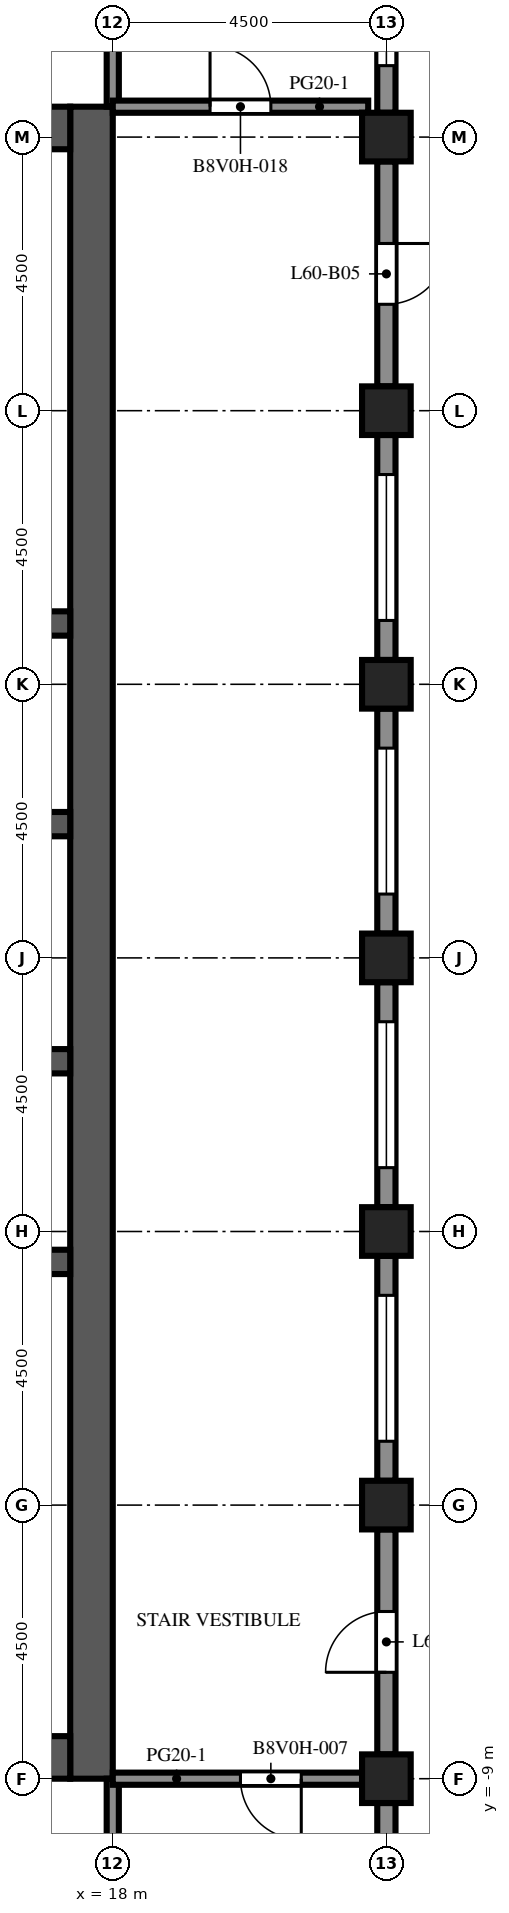
"""IFC4 building model, lengths in metres.
Left out: names, types, materials, properties, quantities, classifications, styles, units other than length and angle.
Written with IfcOpenShell. Run it as: python <this file> out.ifc"""

import sys

from ifc_helpers import new_model, si_unit, direction, frame, frame_2d, origin, origin_2d, place, context, subcontext, project, spatial, rectangle, extrude, element, fill, save


model = new_model("IFC4")
c1 = context("Model", 3, precision=1e-05, world=origin(), true_north=direction((0.0, 1.0)))
c2 = subcontext(c1, "Body", "Model", "MODEL_VIEW")
j1 = project(units=[si_unit("LENGTHUNIT", "METRE"), si_unit("PLANEANGLEUNIT", "RADIAN")], contexts=[c1])
p1 = place(None, origin())
s1 = spatial("IfcSite", under=j1, at=p1, CompositionType="ELEMENT")
p2 = place(p1, origin())
s2 = spatial("IfcBuilding", under=s1, at=p2, CompositionType="ELEMENT")
p3 = place(p2, frame((0.0, 0.0, 266.3)))
s3 = spatial("IfcBuildingStorey", under=s2, at=p3, CompositionType="ELEMENT", Elevation=266.3)
for number, where, z_axis, x_axis in (
    (1, (22.5, -9.0, -0.45), (0.0, 0.0, 1.0), (1.0, 0.0, 0.0)),
    (2, (22.5, -4.5, -0.45), (0.0, 0.0, 1.0), (1.0, 0.0, 0.0)),
    (3, (22.5, 0.0, -0.45), (0.0, 0.0, 1.0), (1.0, 0.0, 0.0)),
    (4, (22.5, 4.5, -0.45), (0.0, 0.0, 1.0), (1.0, 0.0, 0.0)),
    (5, (22.5, 9.0, -0.45), (0.0, 0.0, 1.0), (1.0, 0.0, 0.0)),
    (6, (22.5, 13.5, -0.45), (0.0, 0.0, 1.0), (1.0, 0.0, 0.0)),
    (7, (22.5, 18.0, -0.45), (0.0, 0.0, 1.0), (1.0, 0.0, 0.0)),
):
    element("IfcColumn", number, at=place(p3, frame(where, z_axis=z_axis, x_axis=x_axis)), inside=s3, PredefinedType="COLUMN", context=c2, shape_type="SweptSolid", body=[
        extrude(rectangle(XDim=0.8, YDim=0.8, at=origin_2d()), origin(), (0.0, 0.0, 1.0), 4.55),
    ])
p4 = place(p3, frame((17.65, -9.0, 0.0), z_axis=(0.0, 0.0, 1.0), x_axis=(0.0, 1.0, 0.0)))
e8 = element("IfcWall", 8, at=p4, inside=s3, PredefinedType="SHEAR", context=c2, shape_type="SweptSolid", body=[
    extrude(rectangle(XDim=27.5, YDim=0.7, at=frame_2d((13.75, 0.0))), origin(), (0.0, 0.0, 1.0), 4.1),
])
p5 = place(p4, frame((12.55, 0.0, 0.0)))
e9 = element("IfcOpeningElement", 9, at=p5, cuts=e8, PredefinedType="OPENING", context=c2, shape_type="SweptSolid", body=[
    extrude(rectangle(XDim=2.4, YDim=2.4, at=frame_2d((1.2, 1.2))), frame((0.0, 0.36, 0.0), z_axis=(0.0, -1.0, 0.0), x_axis=(1.0, 0.0, 0.0)), (0.0, 0.0, 1.0), 0.72),
])
p6 = place(p4, frame((6.825, 0.0, 0.0)))
e10 = element("IfcOpeningElement", 10, at=p6, cuts=e8, PredefinedType="OPENING", context=c2, shape_type="SweptSolid", body=[
    extrude(rectangle(XDim=1.2, YDim=2.1, at=frame_2d((0.6, 1.05))), frame((0.0, 0.36, 0.0), z_axis=(0.0, -1.0, 0.0), x_axis=(1.0, 0.0, 0.0)), (0.0, 0.0, 1.0), 0.72),
])
p7 = place(p4, frame((19.475, 0.0, 0.0)))
e11 = element("IfcOpeningElement", 11, at=p7, cuts=e8, PredefinedType="OPENING", context=c2, shape_type="SweptSolid", body=[
    extrude(rectangle(XDim=1.2, YDim=2.1, at=frame_2d((0.6, 1.05))), frame((0.0, 0.36, 0.0), z_axis=(0.0, -1.0, 0.0), x_axis=(1.0, 0.0, 0.0)), (0.0, 0.0, 1.0), 0.72),
])
for number, where, z_axis, x_axis in (
    (12, (6.7, -8.65, 0.0), (0.0, 0.0, 1.0), (1.0, 0.0, 0.0)),
    (13, (6.7, 18.15, 0.0), (0.0, 0.0, 1.0), (1.0, 0.0, 0.0)),
):
    element("IfcWall", number, at=place(p3, frame(where, z_axis=z_axis, x_axis=x_axis)), inside=s3, PredefinedType="SHEAR", context=c2, shape_type="SweptSolid", body=[
        extrude(rectangle(XDim=10.6, YDim=0.7, at=frame_2d((5.3, 0.0))), origin(), (0.0, 0.0, 1.0), 4.1),
    ])
p8 = place(p3, frame((6.7, -0.5, 0.0), z_axis=(0.0, 0.0, 1.0), x_axis=(1.0, 0.0, 0.0)))
e14 = element("IfcWall", 14, at=p8, inside=s3, PredefinedType="SHEAR", context=c2, shape_type="SweptSolid", body=[
    extrude(rectangle(XDim=10.6, YDim=0.4, at=frame_2d((5.3, 0.0))), origin(), (0.0, 0.0, 1.0), 4.1),
])
p9 = place(p3, frame((6.7, 2.8, 0.0), z_axis=(0.0, 0.0, 1.0), x_axis=(1.0, 0.0, 0.0)))
e15 = element("IfcWall", 15, at=p9, inside=s3, PredefinedType="SHEAR", context=c2, shape_type="SweptSolid", body=[
    extrude(rectangle(XDim=10.6, YDim=0.4, at=frame_2d((5.3, 0.0))), origin(), (0.0, 0.0, 1.0), 4.1),
])
p10 = place(p9, frame((0.688, 0.0, 0.0)))
e16 = element("IfcOpeningElement", 16, at=p10, cuts=e15, PredefinedType="OPENING", context=c2, shape_type="SweptSolid", body=[
    extrude(rectangle(XDim=1.1, YDim=2.1, at=frame_2d((0.55, 1.05))), frame((0.0, 0.21, 0.0), z_axis=(0.0, -1.0, 0.0), x_axis=(1.0, 0.0, 0.0)), (0.0, 0.0, 1.0), 0.42),
])
p11 = place(p9, frame((3.438, 0.0, 0.0)))
e17 = element("IfcOpeningElement", 17, at=p11, cuts=e15, PredefinedType="OPENING", context=c2, shape_type="SweptSolid", body=[
    extrude(rectangle(XDim=1.1, YDim=2.1, at=frame_2d((0.55, 1.05))), frame((0.0, 0.21, 0.0), z_axis=(0.0, -1.0, 0.0), x_axis=(1.0, 0.0, 0.0)), (0.0, 0.0, 1.0), 0.42),
])
p12 = place(p9, frame((6.113, 0.0, 0.0)))
e18 = element("IfcOpeningElement", 18, at=p12, cuts=e15, PredefinedType="OPENING", context=c2, shape_type="SweptSolid", body=[
    extrude(rectangle(XDim=1.0, YDim=2.1, at=frame_2d((0.5, 1.05))), frame((0.0, 0.21, 0.0), z_axis=(0.0, -1.0, 0.0), x_axis=(1.0, 0.0, 0.0)), (0.0, 0.0, 1.0), 0.42),
])
p13 = place(p9, frame((8.863, 0.0, 0.0)))
e19 = element("IfcOpeningElement", 19, at=p13, cuts=e15, PredefinedType="OPENING", context=c2, shape_type="SweptSolid", body=[
    extrude(rectangle(XDim=1.0, YDim=2.1, at=frame_2d((0.5, 1.05))), frame((0.0, 0.21, 0.0), z_axis=(0.0, -1.0, 0.0), x_axis=(1.0, 0.0, 0.0)), (0.0, 0.0, 1.0), 0.42),
])
p14 = place(p3, frame((6.7, 6.7, 0.0), z_axis=(0.0, 0.0, 1.0), x_axis=(1.0, 0.0, 0.0)))
e20 = element("IfcWall", 20, at=p14, inside=s3, PredefinedType="SHEAR", context=c2, shape_type="SweptSolid", body=[
    extrude(rectangle(XDim=10.6, YDim=0.4, at=frame_2d((5.3, 0.0))), origin(), (0.0, 0.0, 1.0), 4.1),
])
p15 = place(p14, frame((3.438, 0.0, 0.0)))
e21 = element("IfcOpeningElement", 21, at=p15, cuts=e20, PredefinedType="OPENING", context=c2, shape_type="SweptSolid", body=[
    extrude(rectangle(XDim=1.1, YDim=2.1, at=frame_2d((0.55, 1.05))), frame((0.0, 0.21, 0.0), z_axis=(0.0, -1.0, 0.0), x_axis=(1.0, 0.0, 0.0)), (0.0, 0.0, 1.0), 0.42),
])
p16 = place(p14, frame((6.062, 0.0, 0.0)))
e22 = element("IfcOpeningElement", 22, at=p16, cuts=e20, PredefinedType="OPENING", context=c2, shape_type="SweptSolid", body=[
    extrude(rectangle(XDim=1.1, YDim=2.1, at=frame_2d((0.55, 1.05))), frame((0.0, 0.21, 0.0), z_axis=(0.0, -1.0, 0.0), x_axis=(1.0, 0.0, 0.0)), (0.0, 0.0, 1.0), 0.42),
])
p17 = place(p14, frame((8.812, 0.0, 0.0)))
e23 = element("IfcOpeningElement", 23, at=p17, cuts=e20, PredefinedType="OPENING", context=c2, shape_type="SweptSolid", body=[
    extrude(rectangle(XDim=1.1, YDim=2.1, at=frame_2d((0.55, 1.05))), frame((0.0, 0.21, 0.0), z_axis=(0.0, -1.0, 0.0), x_axis=(1.0, 0.0, 0.0)), (0.0, 0.0, 1.0), 0.42),
])
p18 = place(p14, frame((0.738, 0.0, 0.0)))
e24 = element("IfcOpeningElement", 24, at=p18, cuts=e20, PredefinedType="OPENING", context=c2, shape_type="SweptSolid", body=[
    extrude(rectangle(XDim=1.0, YDim=2.1, at=frame_2d((0.5, 1.05))), frame((0.0, 0.21, 0.0), z_axis=(0.0, -1.0, 0.0), x_axis=(1.0, 0.0, 0.0)), (0.0, 0.0, 1.0), 0.42),
])
p19 = place(p3, frame((6.7, 10.0, 0.0), z_axis=(0.0, 0.0, 1.0), x_axis=(1.0, 0.0, 0.0)))
e25 = element("IfcWall", 25, at=p19, inside=s3, PredefinedType="SHEAR", context=c2, shape_type="SweptSolid", body=[
    extrude(rectangle(XDim=10.6, YDim=0.4, at=frame_2d((5.3, 0.0))), origin(), (0.0, 0.0, 1.0), 4.1),
])
p20 = place(p3, frame((22.5, -9.4, 0.0), z_axis=(0.0, 0.0, 1.0), x_axis=(0.0, -1.0, 0.0)))
e26 = element("IfcWall", 26, at=p20, inside=s3, PredefinedType="SOLIDWALL", context=c2, shape_type="SweptSolid", body=[
    extrude(rectangle(XDim=3.7, YDim=0.3, at=frame_2d((1.85, 0.0))), origin(), (0.0, 0.0, 1.0), 2.85),
])
p21 = place(p20, frame((0.65, 0.0, 0.8)))
e27 = element("IfcOpeningElement", 27, at=p21, cuts=e26, PredefinedType="OPENING", context=c2, shape_type="SweptSolid", body=[
    extrude(rectangle(XDim=2.4, YDim=1.7, at=frame_2d((1.2, 0.85))), frame((0.0, 0.16, 0.0), z_axis=(0.0, -1.0, 0.0), x_axis=(1.0, 0.0, 0.0)), (0.0, 0.0, 1.0), 0.32),
])
p22 = place(p3, frame((22.5, -4.9, 0.0), z_axis=(0.0, 0.0, 1.0), x_axis=(0.0, -1.0, 0.0)))
e28 = element("IfcWall", 28, at=p22, inside=s3, PredefinedType="SOLIDWALL", context=c2, shape_type="SweptSolid", body=[
    extrude(rectangle(XDim=3.7, YDim=0.3, at=frame_2d((1.85, 0.0))), origin(), (0.0, 0.0, 1.0), 2.85),
])
p23 = place(p22, frame((1.35, 0.0, 0.0)))
e29 = element("IfcOpeningElement", 29, at=p23, cuts=e28, PredefinedType="OPENING", context=c2, shape_type="SweptSolid", body=[
    extrude(rectangle(XDim=1.0, YDim=2.2, at=frame_2d((0.5, 1.1))), frame((0.0, 0.16, 0.0), z_axis=(0.0, -1.0, 0.0), x_axis=(1.0, 0.0, 0.0)), (0.0, 0.0, 1.0), 0.32),
])
p24 = place(p3, frame((22.5, -0.4, 0.0), z_axis=(0.0, 0.0, 1.0), x_axis=(0.0, -1.0, 0.0)))
e30 = element("IfcWall", 30, at=p24, inside=s3, PredefinedType="SOLIDWALL", context=c2, shape_type="SweptSolid", body=[
    extrude(rectangle(XDim=3.7, YDim=0.3, at=frame_2d((1.85, 0.0))), origin(), (0.0, 0.0, 1.0), 2.85),
])
p25 = place(p24, frame((0.65, 0.0, 0.8)))
e31 = element("IfcOpeningElement", 31, at=p25, cuts=e30, PredefinedType="OPENING", context=c2, shape_type="SweptSolid", body=[
    extrude(rectangle(XDim=2.4, YDim=1.7, at=frame_2d((1.2, 0.85))), frame((0.0, 0.16, 0.0), z_axis=(0.0, -1.0, 0.0), x_axis=(1.0, 0.0, 0.0)), (0.0, 0.0, 1.0), 0.32),
])
p26 = place(p3, frame((22.5, 4.1, 0.0), z_axis=(0.0, 0.0, 1.0), x_axis=(0.0, -1.0, 0.0)))
e32 = element("IfcWall", 32, at=p26, inside=s3, PredefinedType="SOLIDWALL", context=c2, shape_type="SweptSolid", body=[
    extrude(rectangle(XDim=3.7, YDim=0.3, at=frame_2d((1.85, 0.0))), origin(), (0.0, 0.0, 1.0), 2.85),
])
p27 = place(p26, frame((0.65, 0.0, 0.8)))
e33 = element("IfcOpeningElement", 33, at=p27, cuts=e32, PredefinedType="OPENING", context=c2, shape_type="SweptSolid", body=[
    extrude(rectangle(XDim=2.4, YDim=1.7, at=frame_2d((1.2, 0.85))), frame((0.0, 0.16, 0.0), z_axis=(0.0, -1.0, 0.0), x_axis=(1.0, 0.0, 0.0)), (0.0, 0.0, 1.0), 0.32),
])
p28 = place(p3, frame((22.5, 8.6, 0.0), z_axis=(0.0, 0.0, 1.0), x_axis=(0.0, -1.0, 0.0)))
e34 = element("IfcWall", 34, at=p28, inside=s3, PredefinedType="SOLIDWALL", context=c2, shape_type="SweptSolid", body=[
    extrude(rectangle(XDim=3.7, YDim=0.3, at=frame_2d((1.85, 0.0))), origin(), (0.0, 0.0, 1.0), 2.85),
])
p29 = place(p28, frame((0.65, 0.0, 0.8)))
e35 = element("IfcOpeningElement", 35, at=p29, cuts=e34, PredefinedType="OPENING", context=c2, shape_type="SweptSolid", body=[
    extrude(rectangle(XDim=2.4, YDim=1.7, at=frame_2d((1.2, 0.85))), frame((0.0, 0.16, 0.0), z_axis=(0.0, -1.0, 0.0), x_axis=(1.0, 0.0, 0.0)), (0.0, 0.0, 1.0), 0.32),
])
p30 = place(p3, frame((22.5, 13.1, 0.0), z_axis=(0.0, 0.0, 1.0), x_axis=(0.0, -1.0, 0.0)))
e36 = element("IfcWall", 36, at=p30, inside=s3, PredefinedType="SOLIDWALL", context=c2, shape_type="SweptSolid", body=[
    extrude(rectangle(XDim=3.7, YDim=0.3, at=frame_2d((1.85, 0.0))), origin(), (0.0, 0.0, 1.0), 2.85),
])
p31 = place(p30, frame((0.65, 0.0, 0.8)))
e37 = element("IfcOpeningElement", 37, at=p31, cuts=e36, PredefinedType="OPENING", context=c2, shape_type="SweptSolid", body=[
    extrude(rectangle(XDim=2.4, YDim=1.7, at=frame_2d((1.2, 0.85))), frame((0.0, 0.16, 0.0), z_axis=(0.0, -1.0, 0.0), x_axis=(1.0, 0.0, 0.0)), (0.0, 0.0, 1.0), 0.32),
])
p32 = place(p3, frame((22.5, 17.6, 0.0), z_axis=(0.0, 0.0, 1.0), x_axis=(0.0, -1.0, 0.0)))
e38 = element("IfcWall", 38, at=p32, inside=s3, PredefinedType="SOLIDWALL", context=c2, shape_type="SweptSolid", body=[
    extrude(rectangle(XDim=3.7, YDim=0.3, at=frame_2d((1.85, 0.0))), origin(), (0.0, 0.0, 1.0), 2.85),
])
p33 = place(p32, frame((1.35, 0.0, 0.0)))
e39 = element("IfcOpeningElement", 39, at=p33, cuts=e38, PredefinedType="OPENING", context=c2, shape_type="SweptSolid", body=[
    extrude(rectangle(XDim=1.0, YDim=2.2, at=frame_2d((0.5, 1.1))), frame((0.0, 0.16, 0.0), z_axis=(0.0, -1.0, 0.0), x_axis=(1.0, 0.0, 0.0)), (0.0, 0.0, 1.0), 0.32),
])
p34 = place(p3, frame((22.5, 22.1, 0.0), z_axis=(0.0, 0.0, 1.0), x_axis=(0.0, -1.0, 0.0)))
e40 = element("IfcWall", 40, at=p34, inside=s3, PredefinedType="SOLIDWALL", context=c2, shape_type="SweptSolid", body=[
    extrude(rectangle(XDim=3.7, YDim=0.3, at=frame_2d((1.85, 0.0))), origin(), (0.0, 0.0, 1.0), 2.85),
])
p35 = place(p34, frame((0.525, 0.0, 0.8)))
e41 = element("IfcOpeningElement", 41, at=p35, cuts=e40, PredefinedType="OPENING", context=c2, shape_type="SweptSolid", body=[
    extrude(rectangle(XDim=2.4, YDim=1.7, at=frame_2d((1.2, 0.85))), frame((0.0, 0.16, 0.0), z_axis=(0.0, -1.0, 0.0), x_axis=(1.0, 0.0, 0.0)), (0.0, 0.0, 1.0), 0.32),
])
p36 = place(p3, frame((18.0, -17.577, 0.0), z_axis=(0.0, 0.0, 1.0), x_axis=(0.0, 1.0, 0.0)))
e42 = element("IfcWall", 42, at=p36, inside=s3, PredefinedType="PARTITIONING", context=c2, shape_type="SweptSolid", body=[
    extrude(rectangle(XDim=8.577, YDim=0.2, at=frame_2d((4.289, 0.0))), origin(), (0.0, 0.0, 1.0), 3.65),
])
p37 = place(p3, frame((18.0, 18.5, 0.0), z_axis=(0.0, 0.0, 1.0), x_axis=(0.0, 1.0, 0.0)))
e43 = element("IfcWall", 43, at=p37, inside=s3, PredefinedType="PARTITIONING", context=c2, shape_type="SweptSolid", body=[
    extrude(rectangle(XDim=3.5, YDim=0.2, at=frame_2d((1.75, 0.0))), origin(), (0.0, 0.0, 1.0), 3.65),
])
p38 = place(p3, frame((22.1, -9.0, 0.0), z_axis=(0.0, 0.0, 1.0), x_axis=(-1.0, 0.0, 0.0)))
e44 = element("IfcWall", 44, at=p38, inside=s3, PredefinedType="PARTITIONING", context=c2, shape_type="SweptSolid", body=[
    extrude(rectangle(XDim=4.1, YDim=0.2, at=frame_2d((2.05, 0.0))), origin(), (0.0, 0.0, 1.0), 3.65),
])
p39 = place(p38, frame((1.0, 0.0, 0.0)))
e45 = element("IfcOpeningElement", 45, at=p39, cuts=e44, PredefinedType="OPENING", context=c2, shape_type="SweptSolid", body=[
    extrude(rectangle(XDim=1.0, YDim=2.1, at=frame_2d((0.5, 1.05))), frame((0.0, 0.11, 0.0), z_axis=(0.0, -1.0, 0.0), x_axis=(1.0, 0.0, 0.0)), (0.0, 0.0, 1.0), 0.22),
])
p40 = place(p3, frame((18.0, 18.5, 0.0), z_axis=(0.0, 0.0, 1.0), x_axis=(1.0, 0.0, 0.0)))
e46 = element("IfcWall", 46, at=p40, inside=s3, PredefinedType="PARTITIONING", context=c2, shape_type="SweptSolid", body=[
    extrude(rectangle(XDim=4.201, YDim=0.2, at=frame_2d((2.101, 0.0))), origin(), (0.0, 0.0, 1.0), 3.65),
])
p41 = place(p40, frame((1.6, 0.0, 0.0)))
e47 = element("IfcOpeningElement", 47, at=p41, cuts=e46, PredefinedType="OPENING", context=c2, shape_type="SweptSolid", body=[
    extrude(rectangle(XDim=1.0, YDim=2.1, at=frame_2d((0.5, 1.05))), frame((0.0, 0.11, 0.0), z_axis=(0.0, -1.0, 0.0), x_axis=(1.0, 0.0, 0.0)), (0.0, 0.0, 1.0), 0.22),
])
p42 = place(p23, origin())
e48 = element("IfcDoor", 48, at=p42, inside=s3, OperationType="SINGLE_SWING_RIGHT", PredefinedType="DOOR", context=c2, shape_type="SweptSolid", body=[
    extrude(rectangle(XDim=1.0, YDim=2.2, at=frame_2d((0.5, 1.1))), frame((0.0, 0.025, 0.0), z_axis=(0.0, -1.0, 0.0), x_axis=(1.0, 0.0, 0.0)), (0.0, 0.0, 1.0), 0.05),
])
fill(e29, e48)
p43 = place(p25, origin())
e49 = element("IfcWindow", 49, at=p43, inside=s3, PartitioningType="SINGLE_PANEL", PredefinedType="WINDOW", context=c2, shape_type="SweptSolid", body=[
    extrude(rectangle(XDim=2.4, YDim=1.7, at=frame_2d((1.2, 0.85))), frame((0.0, 0.03, 0.0), z_axis=(0.0, -1.0, 0.0), x_axis=(1.0, 0.0, 0.0)), (0.0, 0.0, 1.0), 0.06),
])
fill(e31, e49)
p44 = place(p27, origin())
e50 = element("IfcWindow", 50, at=p44, inside=s3, PartitioningType="SINGLE_PANEL", PredefinedType="WINDOW", context=c2, shape_type="SweptSolid", body=[
    extrude(rectangle(XDim=2.4, YDim=1.7, at=frame_2d((1.2, 0.85))), frame((0.0, 0.03, 0.0), z_axis=(0.0, -1.0, 0.0), x_axis=(1.0, 0.0, 0.0)), (0.0, 0.0, 1.0), 0.06),
])
fill(e33, e50)
p45 = place(p29, origin())
e51 = element("IfcWindow", 51, at=p45, inside=s3, PartitioningType="SINGLE_PANEL", PredefinedType="WINDOW", context=c2, shape_type="SweptSolid", body=[
    extrude(rectangle(XDim=2.4, YDim=1.7, at=frame_2d((1.2, 0.85))), frame((0.0, 0.03, 0.0), z_axis=(0.0, -1.0, 0.0), x_axis=(1.0, 0.0, 0.0)), (0.0, 0.0, 1.0), 0.06),
])
fill(e35, e51)
p46 = place(p31, origin())
e52 = element("IfcWindow", 52, at=p46, inside=s3, PartitioningType="SINGLE_PANEL", PredefinedType="WINDOW", context=c2, shape_type="SweptSolid", body=[
    extrude(rectangle(XDim=2.4, YDim=1.7, at=frame_2d((1.2, 0.85))), frame((0.0, 0.03, 0.0), z_axis=(0.0, -1.0, 0.0), x_axis=(1.0, 0.0, 0.0)), (0.0, 0.0, 1.0), 0.06),
])
fill(e37, e52)
p47 = place(p33, origin())
e53 = element("IfcDoor", 53, at=p47, inside=s3, OperationType="SINGLE_SWING_LEFT", PredefinedType="DOOR", context=c2, shape_type="SweptSolid", body=[
    extrude(rectangle(XDim=1.0, YDim=2.2, at=frame_2d((0.5, 1.1))), frame((0.0, 0.025, 0.0), z_axis=(0.0, -1.0, 0.0), x_axis=(1.0, 0.0, 0.0)), (0.0, 0.0, 1.0), 0.05),
])
fill(e39, e53)
p48 = place(p35, origin())
e54 = element("IfcWindow", 54, at=p48, inside=s3, PartitioningType="SINGLE_PANEL", PredefinedType="WINDOW", context=c2, shape_type="SweptSolid", body=[
    extrude(rectangle(XDim=2.4, YDim=1.7, at=frame_2d((1.2, 0.85))), frame((0.0, 0.03, 0.0), z_axis=(0.0, -1.0, 0.0), x_axis=(1.0, 0.0, 0.0)), (0.0, 0.0, 1.0), 0.06),
])
fill(e41, e54)
p49 = place(p5, origin())
e55 = element("IfcDoor", 55, at=p49, inside=s3, OperationType="DOUBLE_DOOR_DOUBLE_SWING", PredefinedType="DOOR", context=c2, shape_type="SweptSolid", body=[
    extrude(rectangle(XDim=2.4, YDim=2.4, at=frame_2d((1.2, 1.2))), frame((0.0, 0.025, 0.0), z_axis=(0.0, -1.0, 0.0), x_axis=(1.0, 0.0, 0.0)), (0.0, 0.0, 1.0), 0.05),
])
fill(e9, e55)
p50 = place(p6, frame((1.2, 0.0, 0.0), z_axis=(0.0, 0.0, 1.0), x_axis=(-1.0, 0.0, 0.0)))
e56 = element("IfcDoor", 56, at=p50, inside=s3, OperationType="SINGLE_SWING_LEFT", PredefinedType="DOOR", context=c2, shape_type="SweptSolid", body=[
    extrude(rectangle(XDim=1.2, YDim=2.1, at=frame_2d((0.6, 1.05))), frame((0.0, 0.025, 0.0), z_axis=(0.0, -1.0, 0.0), x_axis=(1.0, 0.0, 0.0)), (0.0, 0.0, 1.0), 0.05),
])
fill(e10, e56)
p51 = place(p7, frame((1.2, 0.0, 0.0), z_axis=(0.0, 0.0, 1.0), x_axis=(-1.0, 0.0, 0.0)))
e57 = element("IfcDoor", 57, at=p51, inside=s3, OperationType="SINGLE_SWING_LEFT", PredefinedType="DOOR", context=c2, shape_type="SweptSolid", body=[
    extrude(rectangle(XDim=1.2, YDim=2.1, at=frame_2d((0.6, 1.05))), frame((0.0, 0.025, 0.0), z_axis=(0.0, -1.0, 0.0), x_axis=(1.0, 0.0, 0.0)), (0.0, 0.0, 1.0), 0.05),
])
fill(e11, e57)
p52 = place(p39, origin())
e58 = element("IfcDoor", 58, at=p52, inside=s3, OperationType="SINGLE_SWING_LEFT", PredefinedType="DOOR", context=c2, shape_type="SweptSolid", body=[
    extrude(rectangle(XDim=1.0, YDim=2.1, at=frame_2d((0.5, 1.05))), frame((0.0, 0.025, 0.0), z_axis=(0.0, -1.0, 0.0), x_axis=(1.0, 0.0, 0.0)), (0.0, 0.0, 1.0), 0.05),
])
fill(e45, e58)
p53 = place(p41, origin())
e59 = element("IfcDoor", 59, at=p53, inside=s3, OperationType="SINGLE_SWING_LEFT", PredefinedType="DOOR", context=c2, shape_type="SweptSolid", body=[
    extrude(rectangle(XDim=1.0, YDim=2.1, at=frame_2d((0.5, 1.05))), frame((0.0, 0.025, 0.0), z_axis=(0.0, -1.0, 0.0), x_axis=(1.0, 0.0, 0.0)), (0.0, 0.0, 1.0), 0.05),
])
fill(e47, e59)
save(model, sys.argv[1])
